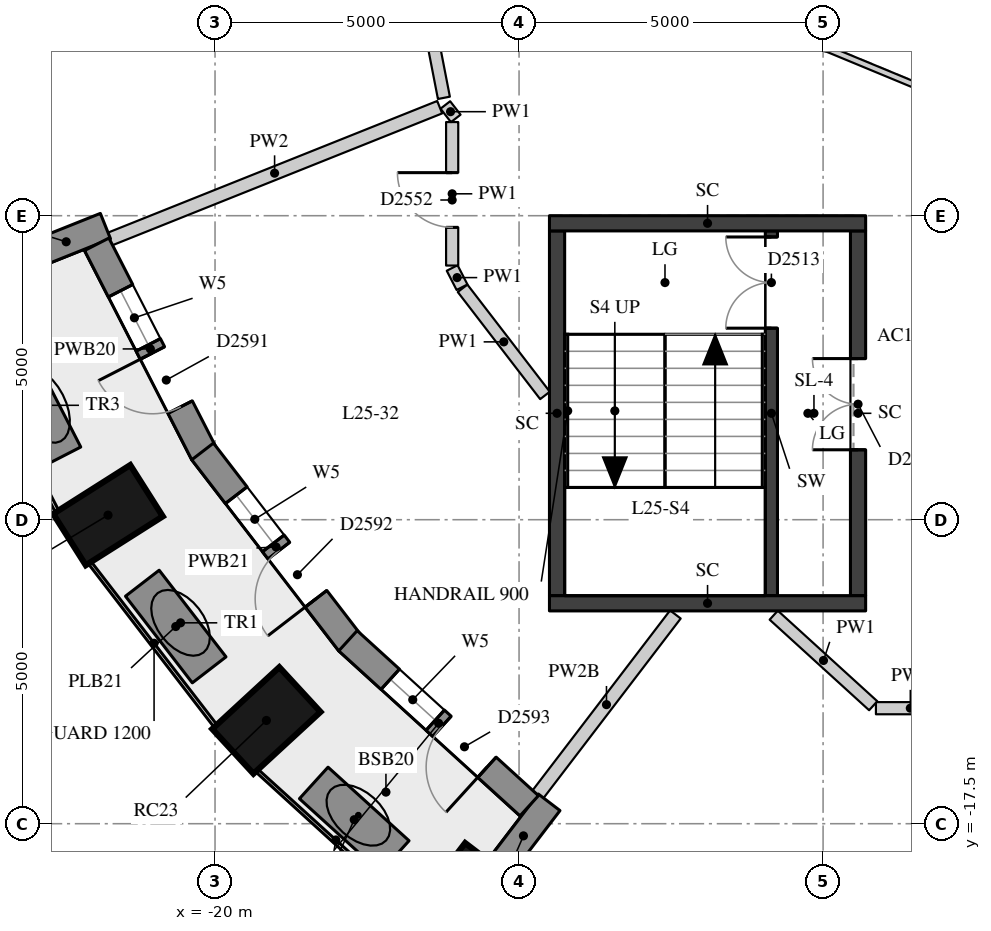
"""IFC4 building model, lengths in metres.
Left out: names, types, materials, properties, quantities, classifications, styles, units other than length and angle.
Written with IfcOpenShell. Run it as: python <this file> out.ifc"""

import sys

from ifc_helpers import new_model, si_unit, direction, frame, frame_2d, origin, origin_2d, place, context, subcontext, project, spatial, rectangle, extrude, element, fill, save


model = new_model("IFC4")
c1 = context("Model", 3, precision=1e-05, world=origin(), true_north=direction((0.0, 1.0)))
c2 = subcontext(c1, "Body", "Model", "MODEL_VIEW")
j1 = project(units=[si_unit("LENGTHUNIT", "METRE"), si_unit("PLANEANGLEUNIT", "RADIAN")], contexts=[c1])
p1 = place(None, origin())
s1 = spatial("IfcSite", under=j1, at=p1, CompositionType="ELEMENT")
p2 = place(p1, origin())
s2 = spatial("IfcBuilding", under=s1, at=p2, CompositionType="ELEMENT")
p3 = place(p2, frame((0.0, 0.0, 92.2)))
s3 = spatial("IfcBuildingStorey", under=s2, at=p3, CompositionType="ELEMENT", Elevation=92.2)
for number, where, z_axis, x_axis in (
    (1, (-21.76, -12.425, 0.0), (0.0, 0.0, 1.0), (-0.845, -0.536, 0.0)),
    (2, (-19.156, -15.802, 0.0), (0.0, 0.0, 1.0), (-0.735, -0.678, 0.0)),
    (3, (-15.945, -18.717, 0.0), (0.0, 0.0, 1.0), (-0.607, -0.795, 0.0)),
):
    element("IfcColumn", number, at=place(p3, frame(where, z_axis=z_axis, x_axis=x_axis)), inside=s3, PredefinedType="COLUMN", context=c2, shape_type="SweptSolid", body=[
        extrude(rectangle(XDim=1.5, YDim=1.0, at=origin_2d()), origin(), (0.0, 0.0, 1.0), 3.3),
    ])
p4 = place(p3, frame((-23.093, -8.187, 0.0), z_axis=(0.0, 0.0, 1.0), x_axis=(0.928549333349, 0.371209018665, 0.0)))
e4 = element("IfcWall", 4, at=p4, inside=s3, PredefinedType="SOLIDWALL", context=c2, shape_type="SweptSolid", body=[
    extrude(rectangle(XDim=1.39, YDim=0.45, at=frame_2d((0.695, 0.0))), origin(), (0.0, 0.0, 1.0), 3.02),
])
p5 = place(p3, frame((-15.35, -18.253, 0.0), z_axis=(0.0, 0.0, 1.0), x_axis=(0.607026495834, 0.794681592435, 0.0)))
e5 = element("IfcWall", 5, at=p5, inside=s3, PredefinedType="SOLIDWALL", context=c2, shape_type="SweptSolid", body=[
    extrude(rectangle(XDim=1.391, YDim=0.45, at=frame_2d((0.695, 0.0))), origin(), (0.0, 0.0, 1.0), 2.57),
])
p6 = place(p3, frame((-21.945, -7.97, 0.0), z_axis=(0.0, 0.0, 1.0), x_axis=(0.455905146579, -0.89002836883, 0.0)))
e6 = element("IfcWall", 6, at=p6, inside=s3, PredefinedType="SOLIDWALL", context=c2, shape_type="SweptSolid", body=[
    extrude(rectangle(XDim=3.867, YDim=0.45, at=frame_2d((1.934, 0.0))), origin(), (0.0, 0.0, 1.0), 3.02),
])
p7 = place(p6, frame((0.858, 0.0, 0.4)))
e7 = element("IfcOpeningElement", 7, at=p7, cuts=e6, PredefinedType="OPENING", context=c2, shape_type="SweptSolid", body=[
    extrude(rectangle(XDim=1.0, YDim=1.75, at=frame_2d((0.5, 0.875))), frame((0.0, 0.235, 0.0), z_axis=(0.0, -1.0, 0.0), x_axis=(1.0, 0.0, 0.0)), (0.0, 0.0, 1.0), 0.47),
])
p8 = place(p6, frame((2.009, 0.0, 0.0)))
e8 = element("IfcOpeningElement", 8, at=p8, cuts=e6, PredefinedType="OPENING", context=c2, shape_type="SweptSolid", body=[
    extrude(rectangle(XDim=1.0, YDim=2.15, at=frame_2d((0.5, 1.075))), frame((0.0, 0.235, 0.0), z_axis=(0.0, -1.0, 0.0), x_axis=(1.0, 0.0, 0.0)), (0.0, 0.0, 1.0), 0.47),
])
p9 = place(p3, frame((-20.204, -11.377, 0.0), z_axis=(0.0, 0.0, 1.0), x_axis=(0.609698858135, -0.792633144897, 0.0)))
e9 = element("IfcWall", 9, at=p9, inside=s3, PredefinedType="SOLIDWALL", context=c2, shape_type="SweptSolid", body=[
    extrude(rectangle(XDim=3.965, YDim=0.45, at=frame_2d((1.982, 0.0))), origin(), (0.0, 0.0, 1.0), 3.02),
])
p10 = place(p9, frame((0.907, 0.0, 0.4)))
e10 = element("IfcOpeningElement", 10, at=p10, cuts=e9, PredefinedType="OPENING", context=c2, shape_type="SweptSolid", body=[
    extrude(rectangle(XDim=1.0, YDim=1.75, at=frame_2d((0.5, 0.875))), frame((0.0, 0.235, 0.0), z_axis=(0.0, -1.0, 0.0), x_axis=(1.0, 0.0, 0.0)), (0.0, 0.0, 1.0), 0.47),
])
p11 = place(p9, frame((2.058, 0.0, 0.0)))
e11 = element("IfcOpeningElement", 11, at=p11, cuts=e9, PredefinedType="OPENING", context=c2, shape_type="SweptSolid", body=[
    extrude(rectangle(XDim=1.0, YDim=2.15, at=frame_2d((0.5, 1.075))), frame((0.0, 0.235, 0.0), z_axis=(0.0, -1.0, 0.0), x_axis=(1.0, 0.0, 0.0)), (0.0, 0.0, 1.0), 0.47),
])
p12 = place(p3, frame((-17.814, -14.491, 0.0), z_axis=(0.0, 0.0, 1.0), x_axis=(0.73951517403, -0.673139886933, 0.0)))
e12 = element("IfcWall", 12, at=p12, inside=s3, PredefinedType="SOLIDWALL", context=c2, shape_type="SweptSolid", body=[
    extrude(rectangle(XDim=4.031, YDim=0.45, at=frame_2d((2.016, 0.0))), origin(), (0.0, 0.0, 1.0), 3.02),
])
p13 = place(p12, frame((0.941, 0.0, 0.4)))
e13 = element("IfcOpeningElement", 13, at=p13, cuts=e12, PredefinedType="OPENING", context=c2, shape_type="SweptSolid", body=[
    extrude(rectangle(XDim=1.0, YDim=1.75, at=frame_2d((0.5, 0.875))), frame((0.0, 0.235, 0.0), z_axis=(0.0, -1.0, 0.0), x_axis=(1.0, 0.0, 0.0)), (0.0, 0.0, 1.0), 0.47),
])
p14 = place(p12, frame((2.091, 0.0, 0.0)))
e14 = element("IfcOpeningElement", 14, at=p14, cuts=e12, PredefinedType="OPENING", context=c2, shape_type="SweptSolid", body=[
    extrude(rectangle(XDim=1.0, YDim=2.15, at=frame_2d((0.5, 1.075))), frame((0.0, 0.235, 0.0), z_axis=(0.0, -1.0, 0.0), x_axis=(1.0, 0.0, 0.0)), (0.0, 0.0, 1.0), 0.47),
])
p15 = place(p3, frame((-23.342, -9.864, 0.0), z_axis=(0.0, 0.0, 1.0), x_axis=(0.456845298981, -0.88954616114, 0.0)))
e15 = element("IfcWall", 15, at=p15, inside=s3, PredefinedType="USERDEFINED", context=c2, shape_type="SweptSolid", body=[
    extrude(rectangle(XDim=1.8, YDim=0.7, at=frame_2d((0.9, 0.0))), origin(), (0.0, 0.0, 1.0), 0.75),
])
p16 = place(p3, frame((-21.196, -13.544, 0.0), z_axis=(0.0, 0.0, 1.0), x_axis=(0.610686846919, -0.791872196127, 0.0)))
e16 = element("IfcWall", 16, at=p16, inside=s3, PredefinedType="USERDEFINED", context=c2, shape_type="SweptSolid", body=[
    extrude(rectangle(XDim=1.8, YDim=0.7, at=frame_2d((0.9, 0.0))), origin(), (0.0, 0.0, 1.0), 0.75),
])
p17 = place(p3, frame((-18.377, -16.829, 0.0), z_axis=(0.0, 0.0, 1.0), x_axis=(0.740332755969, -0.6722405897, 0.0)))
e17 = element("IfcWall", 17, at=p17, inside=s3, PredefinedType="USERDEFINED", context=c2, shape_type="SweptSolid", body=[
    extrude(rectangle(XDim=1.8, YDim=0.7, at=frame_2d((0.9, 0.0))), origin(), (0.0, 0.0, 1.0), 0.75),
])
p18 = place(p3, frame((-10.85, -13.75, 0.0), z_axis=(0.0, 0.0, 1.0), x_axis=(0.0, 1.0, 0.0)))
e18 = element("IfcWall", 18, at=p18, inside=s3, PredefinedType="SHEAR", context=c2, shape_type="SweptSolid", body=[
    extrude(rectangle(XDim=6.0, YDim=0.2, at=frame_2d((3.0, 0.0))), origin(), (0.0, 0.0, 1.0), 3.02),
])
p19 = place(p18, frame((4.4, 0.0, 0.0)))
e19 = element("IfcOpeningElement", 19, at=p19, cuts=e18, PredefinedType="OPENING", context=c2, shape_type="SweptSolid", body=[
    extrude(rectangle(XDim=1.5, YDim=2.1, at=frame_2d((0.75, 1.05))), frame((0.0, 0.11, 0.0), z_axis=(0.0, -1.0, 0.0), x_axis=(1.0, 0.0, 0.0)), (0.0, 0.0, 1.0), 0.22),
])
p20 = place(p3, frame((-14.375, -13.75, -0.28), z_axis=(0.0, 0.0, 1.0), x_axis=(0.0, 1.0, 0.0)))
e20 = element("IfcWall", 20, at=p20, inside=s3, PredefinedType="SHEAR", context=c2, shape_type="SweptSolid", body=[
    extrude(rectangle(XDim=6.0, YDim=0.25, at=frame_2d((3.0, 0.0))), origin(), (0.0, 0.0, 1.0), 3.3),
])
p21 = place(p3, frame((-9.425, -13.75, -0.28), z_axis=(0.0, 0.0, 1.0), x_axis=(0.0, 1.0, 0.0)))
e21 = element("IfcWall", 21, at=p21, inside=s3, PredefinedType="SHEAR", context=c2, shape_type="SweptSolid", body=[
    extrude(rectangle(XDim=6.0, YDim=0.25, at=frame_2d((3.0, 0.0))), origin(), (0.0, 0.0, 1.0), 3.3),
])
p22 = place(p21, frame((2.4, 0.0, 0.28)))
e22 = element("IfcOpeningElement", 22, at=p22, cuts=e21, PredefinedType="OPENING", context=c2, shape_type="SweptSolid", body=[
    extrude(rectangle(XDim=1.5, YDim=2.1, at=frame_2d((0.75, 1.05))), frame((0.0, 0.135, 0.0), z_axis=(0.0, -1.0, 0.0), x_axis=(1.0, 0.0, 0.0)), (0.0, 0.0, 1.0), 0.27),
])
for number, where, z_axis, x_axis in (
    (23, (-14.5, -7.625, -0.28), (0.0, 0.0, 1.0), (1.0, 0.0, 0.0)),
    (24, (-14.5, -13.875, -0.28), (0.0, 0.0, 1.0), (1.0, 0.0, 0.0)),
):
    element("IfcWall", number, at=place(p3, frame(where, z_axis=z_axis, x_axis=x_axis)), inside=s3, PredefinedType="SHEAR", context=c2, shape_type="SweptSolid", body=[
        extrude(rectangle(XDim=5.2, YDim=0.25, at=frame_2d((2.6, 0.0))), origin(), (0.0, 0.0, 1.0), 3.3),
    ])
p23 = place(p3, frame((-14.573, -10.456, 0.0), z_axis=(0.0, 0.0, 1.0), x_axis=(-0.60967360535, 0.792652568872, 0.0)))
e25 = element("IfcWall", 25, at=p23, inside=s3, PredefinedType="PARTITIONING", context=c2, shape_type="SweptSolid", body=[
    extrude(rectangle(XDim=2.223, YDim=0.2, at=frame_2d((1.111, 0.0))), origin(), (0.0, 0.0, 1.0), 3.02),
])
p24 = place(p3, frame((-15.938, -8.676, 0.0), z_axis=(0.0, 0.0, 1.0), x_axis=(-0.456525695549, 0.889710227717, 0.0)))
e26 = element("IfcWall", 26, at=p24, inside=s3, PredefinedType="PARTITIONING", context=c2, shape_type="SweptSolid", body=[
    extrude(rectangle(XDim=0.356, YDim=0.2, at=frame_2d((0.178, 0.0))), origin(), (0.0, 0.0, 1.0), 3.02),
])
p25 = place(p3, frame((-16.1, -8.32, 0.0), z_axis=(0.0, 0.0, 1.0), x_axis=(0.0, 1.0, 0.0)))
e27 = element("IfcWall", 27, at=p25, inside=s3, PredefinedType="PARTITIONING", context=c2, shape_type="SweptSolid", body=[
    extrude(rectangle(XDim=2.36, YDim=0.2, at=frame_2d((1.18, 0.0))), origin(), (0.0, 0.0, 1.0), 3.02),
])
p26 = place(p25, frame((0.628, 0.0, 0.0)))
e28 = element("IfcOpeningElement", 28, at=p26, cuts=e27, PredefinedType="OPENING", context=c2, shape_type="SweptSolid", body=[
    extrude(rectangle(XDim=0.9, YDim=2.1, at=frame_2d((0.45, 1.05))), frame((0.0, 0.11, 0.0), z_axis=(0.0, -1.0, 0.0), x_axis=(1.0, 0.0, 0.0)), (0.0, 0.0, 1.0), 0.22),
])
p27 = place(p3, frame((-16.041, -5.9, 0.0), z_axis=(0.0, 0.0, 1.0), x_axis=(-0.612489897904, 0.790478415243, 0.0)))
e29 = element("IfcWall", 29, at=p27, inside=s3, PredefinedType="PARTITIONING", context=c2, shape_type="SweptSolid", body=[
    extrude(rectangle(XDim=0.28, YDim=0.2, at=frame_2d((0.14, 0.0))), origin(), (0.0, 0.0, 1.0), 3.02),
])
p28 = place(p3, frame((-16.236, -5.562, 0.0), z_axis=(0.0, 0.0, 1.0), x_axis=(-0.190753296708, 0.981638008532, 0.0)))
e30 = element("IfcWall", 30, at=p28, inside=s3, PredefinedType="PARTITIONING", context=c2, shape_type="SweptSolid", body=[
    extrude(rectangle(XDim=5.054, YDim=0.2, at=frame_2d((2.527, 0.0))), origin(), (0.0, 0.0, 1.0), 3.02),
])
p29 = place(p28, frame((3.528, 0.0, 0.0)))
e31 = element("IfcOpeningElement", 31, at=p29, cuts=e30, PredefinedType="OPENING", context=c2, shape_type="SweptSolid", body=[
    extrude(rectangle(XDim=1.1, YDim=2.1, at=frame_2d((0.55, 1.05))), frame((0.0, 0.11, 0.0), z_axis=(0.0, -1.0, 0.0), x_axis=(1.0, 0.0, 0.0)), (0.0, 0.0, 1.0), 0.22),
])
p30 = place(p3, frame((-8.0, -15.6, 0.0), z_axis=(0.0, 0.0, 1.0), x_axis=(-1.0, 0.0, 0.0)))
e32 = element("IfcWall", 32, at=p30, inside=s3, PredefinedType="PARTITIONING", context=c2, shape_type="SweptSolid", body=[
    extrude(rectangle(XDim=1.131, YDim=0.2, at=frame_2d((0.565, 0.0))), origin(), (0.0, 0.0, 1.0), 3.02),
])
p31 = place(p3, frame((-9.176, -15.56, 0.0), z_axis=(0.0, 0.0, 1.0), x_axis=(-0.73943556447, 0.673227336044, 0.0)))
e33 = element("IfcWall", 33, at=p31, inside=s3, PredefinedType="PARTITIONING", context=c2, shape_type="SweptSolid", body=[
    extrude(rectangle(XDim=2.212, YDim=0.2, at=frame_2d((1.106, 0.0))), origin(), (0.0, 0.0, 1.0), 3.02),
])
p32 = place(p3, frame((-21.736, -7.887, 0.0), z_axis=(0.0, 0.0, 1.0), x_axis=(0.928522746632, 0.371275516277, 0.0)))
e34 = element("IfcWall", 34, at=p32, inside=s3, PredefinedType="PARTITIONING", context=c2, shape_type="SweptSolid", body=[
    extrude(rectangle(XDim=5.848, YDim=0.22, at=frame_2d((2.924, 0.0))), origin(), (0.0, 0.0, 1.0), 3.02),
])
p33 = place(p3, frame((-14.696, -17.025, 0.0), z_axis=(0.0, 0.0, 1.0), x_axis=(0.607059278405, 0.794656550028, 0.0)))
e35 = element("IfcWall", 35, at=p33, inside=s3, PredefinedType="PARTITIONING", context=c2, shape_type="SweptSolid", body=[
    extrude(rectangle(XDim=3.734, YDim=0.22, at=frame_2d((1.867, 0.0))), origin(), (0.0, 0.0, 1.0), 2.57),
])
p34 = place(p3, frame((-8.0, -5.554, 0.0), z_axis=(0.0, 0.0, 1.0), x_axis=(-0.923860025149, 0.382730523909, 0.0)))
e36 = element("IfcWall", 36, at=p34, inside=s3, PredefinedType="PARTITIONING", context=c2, shape_type="SweptSolid", body=[
    extrude(rectangle(XDim=4.251, YDim=0.1, at=frame_2d((2.125, 0.0))), origin(), (0.0, 0.0, 1.0), 3.02),
])
p35 = place(p7, origin())
e37 = element("IfcWindow", 37, at=p35, inside=s3, PartitioningType="SINGLE_PANEL", PredefinedType="WINDOW", context=c2, shape_type="SweptSolid", body=[
    extrude(rectangle(XDim=1.0, YDim=1.75, at=frame_2d((0.5, 0.875))), frame((0.0, 0.035, 0.0), z_axis=(0.0, -1.0, 0.0), x_axis=(1.0, 0.0, 0.0)), (0.0, 0.0, 1.0), 0.06),
])
fill(e7, e37)
p36 = place(p8, frame((1.0, 0.0, 0.0), z_axis=(0.0, 0.0, 1.0), x_axis=(-1.0, 0.0, 0.0)))
e38 = element("IfcDoor", 38, at=p36, inside=s3, OperationType="SINGLE_SWING_RIGHT", PredefinedType="DOOR", context=c2, shape_type="SweptSolid", body=[
    extrude(rectangle(XDim=1.0, YDim=2.15, at=frame_2d((0.5, 1.075))), frame((0.0, 0.075, 0.0), z_axis=(0.0, -1.0, 0.0), x_axis=(1.0, 0.0, 0.0)), (0.0, 0.0, 1.0), 0.05),
])
fill(e8, e38)
p37 = place(p10, origin())
e39 = element("IfcWindow", 39, at=p37, inside=s3, PartitioningType="SINGLE_PANEL", PredefinedType="WINDOW", context=c2, shape_type="SweptSolid", body=[
    extrude(rectangle(XDim=1.0, YDim=1.75, at=frame_2d((0.5, 0.875))), frame((0.0, 0.035, 0.0), z_axis=(0.0, -1.0, 0.0), x_axis=(1.0, 0.0, 0.0)), (0.0, 0.0, 1.0), 0.06),
])
fill(e10, e39)
p38 = place(p11, frame((1.0, 0.0, 0.0), z_axis=(0.0, 0.0, 1.0), x_axis=(-1.0, 0.0, 0.0)))
e40 = element("IfcDoor", 40, at=p38, inside=s3, OperationType="SINGLE_SWING_LEFT", PredefinedType="DOOR", context=c2, shape_type="SweptSolid", body=[
    extrude(rectangle(XDim=1.0, YDim=2.15, at=frame_2d((0.5, 1.075))), frame((0.0, 0.075, 0.0), z_axis=(0.0, -1.0, 0.0), x_axis=(1.0, 0.0, 0.0)), (0.0, 0.0, 1.0), 0.05),
])
fill(e11, e40)
p39 = place(p13, origin())
e41 = element("IfcWindow", 41, at=p39, inside=s3, PartitioningType="SINGLE_PANEL", PredefinedType="WINDOW", context=c2, shape_type="SweptSolid", body=[
    extrude(rectangle(XDim=1.0, YDim=1.75, at=frame_2d((0.5, 0.875))), frame((0.0, 0.035, 0.0), z_axis=(0.0, -1.0, 0.0), x_axis=(1.0, 0.0, 0.0)), (0.0, 0.0, 1.0), 0.06),
])
fill(e13, e41)
p40 = place(p14, frame((1.0, 0.0, 0.0), z_axis=(0.0, 0.0, 1.0), x_axis=(-1.0, 0.0, 0.0)))
e42 = element("IfcDoor", 42, at=p40, inside=s3, OperationType="SINGLE_SWING_LEFT", PredefinedType="DOOR", context=c2, shape_type="SweptSolid", body=[
    extrude(rectangle(XDim=1.0, YDim=2.15, at=frame_2d((0.5, 1.075))), frame((0.0, 0.075, 0.0), z_axis=(0.0, -1.0, 0.0), x_axis=(1.0, 0.0, 0.0)), (0.0, 0.0, 1.0), 0.05),
])
fill(e14, e42)
p41 = place(p19, origin())
e43 = element("IfcDoor", 43, at=p41, inside=s3, OperationType="DOUBLE_DOOR_SINGLE_SWING", PredefinedType="DOOR", context=c2, shape_type="SweptSolid", body=[
    extrude(rectangle(XDim=1.5, YDim=2.1, at=frame_2d((0.75, 1.05))), frame((0.0, 0.025, 0.0), z_axis=(0.0, -1.0, 0.0), x_axis=(1.0, 0.0, 0.0)), (0.0, 0.0, 1.0), 0.05),
])
fill(e19, e43)
p42 = place(p22, origin())
e44 = element("IfcDoor", 44, at=p42, inside=s3, OperationType="DOUBLE_DOOR_SINGLE_SWING", PredefinedType="DOOR", context=c2, shape_type="SweptSolid", body=[
    extrude(rectangle(XDim=1.5, YDim=2.1, at=frame_2d((0.75, 1.05))), frame((0.0, 0.025, 0.0), z_axis=(0.0, -1.0, 0.0), x_axis=(1.0, 0.0, 0.0)), (0.0, 0.0, 1.0), 0.05),
])
fill(e22, e44)
p43 = place(p26, origin())
e45 = element("IfcDoor", 45, at=p43, inside=s3, OperationType="SINGLE_SWING_RIGHT", PredefinedType="DOOR", context=c2, shape_type="SweptSolid", body=[
    extrude(rectangle(XDim=0.9, YDim=2.1, at=frame_2d((0.45, 1.05))), frame((0.0, 0.025, 0.0), z_axis=(0.0, -1.0, 0.0), x_axis=(1.0, 0.0, 0.0)), (0.0, 0.0, 1.0), 0.05),
])
fill(e28, e45)
save(model, sys.argv[1])
